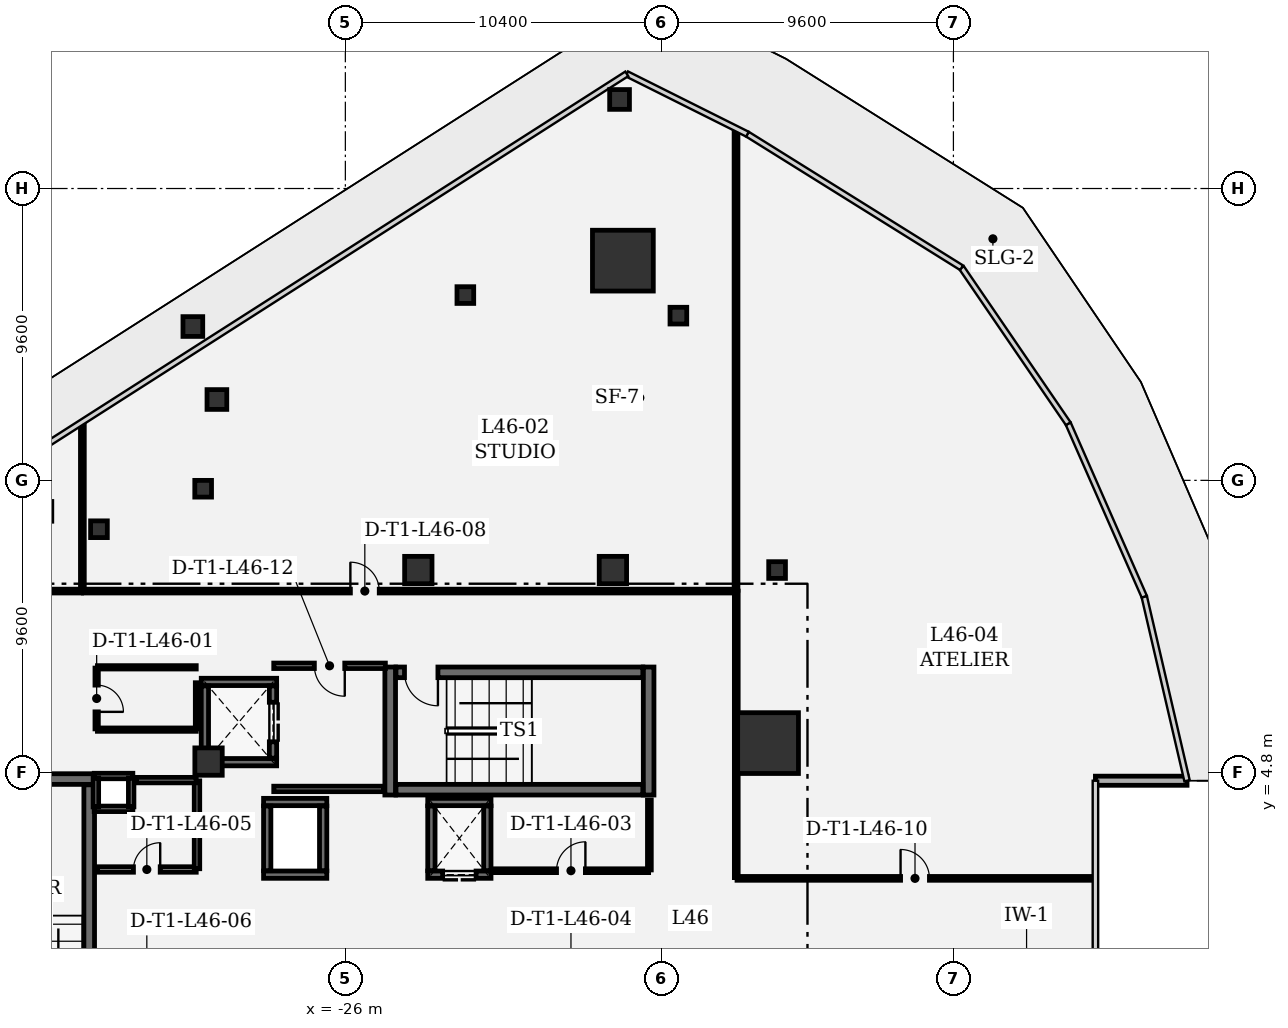
"""IFC4 building model, lengths in metres.
Left out: names, types, materials, properties, quantities, classifications, styles, units other than length and angle.
Written with IfcOpenShell. Run it as: python <this file> out.ifc"""

import sys

from ifc_helpers import new_model, si_unit, direction, frame, frame_2d, origin, origin_2d, place, context, subcontext, project, spatial, rectangle, extrude, element, fill, save


model = new_model("IFC4")
c1 = context("Model", 3, precision=1e-05, world=origin(), true_north=direction((0.0, 1.0)))
c2 = subcontext(c1, "Body", "Model", "MODEL_VIEW")
j1 = project(units=[si_unit("LENGTHUNIT", "METRE"), si_unit("PLANEANGLEUNIT", "RADIAN")], contexts=[c1])
p1 = place(None, origin())
s1 = spatial("IfcSite", under=j1, at=p1, CompositionType="ELEMENT")
p2 = place(p1, origin())
s2 = spatial("IfcBuilding", under=s1, at=p2, CompositionType="ELEMENT")
p3 = place(p2, frame((0.0, 0.0, 201.0)))
s3 = spatial("IfcBuildingStorey", under=s2, at=p3, CompositionType="ELEMENT", Elevation=201.0)
for number, where, z_axis, x_axis in (
    (1, (-12.097, 5.758, 0.0), (0.0, 0.0, 1.0), (1.0, 0.0, 0.0)),
    (2, (-16.872, 21.627, 0.0), (0.0, 0.0, 1.0), (1.0, 0.0, 0.0)),
):
    element("IfcColumn", number, at=place(p3, frame(where, z_axis=z_axis, x_axis=x_axis)), inside=s3, PredefinedType="COLUMN", context=c2, shape_type="SweptSolid", body=[
        extrude(rectangle(XDim=2.0, YDim=2.0, at=origin_2d()), origin(), (0.0, 0.0, 1.0), 4.05),
    ])
for number, where, z_axis, x_axis in (
    (3, (-23.6, 11.45, 0.0), (0.0, 0.0, 1.0), (1.0, 0.0, 0.0)),
    (4, (-17.2, 11.45, 0.0), (0.0, 0.0, 1.0), (1.0, 0.0, 0.0)),
    (5, (-30.5, 5.15, 0.0), (0.0, 0.0, 1.0), (1.0, 0.0, 0.0)),
):
    element("IfcColumn", number, at=place(p3, frame(where, z_axis=z_axis, x_axis=x_axis)), inside=s3, PredefinedType="COLUMN", context=c2, shape_type="SweptSolid", body=[
        extrude(rectangle(XDim=0.9, YDim=0.9, at=origin_2d()), origin(), (0.0, 0.0, 1.0), 4.05),
    ])
for number, where, z_axis, x_axis in (
    (6, (-31.016, 19.46, 0.0), (0.0, 0.0, 1.0), (1.0, 0.0, 0.0)),
    (7, (-16.981, 26.929, 0.0), (0.0, 0.0, 1.0), (1.0, 0.0, 0.0)),
    (8, (-30.225, 17.06, 0.0), (0.0, 0.0, 1.0), (1.0, 0.0, 0.0)),
):
    element("IfcColumn", number, at=place(p3, frame(where, z_axis=z_axis, x_axis=x_axis)), inside=s3, PredefinedType="COLUMN", context=c2, shape_type="SweptSolid", body=[
        extrude(rectangle(XDim=0.65, YDim=0.65, at=origin_2d()), origin(), (0.0, 0.0, 1.0), 4.05),
    ])
for number, where, z_axis, x_axis in (
    (9, (-34.104, 12.792, 0.0), (0.0, 0.0, 1.0), (1.0, 0.0, 0.0)),
    (10, (-22.053, 20.495, 0.0), (0.0, 0.0, 1.0), (1.0, 0.0, 0.0)),
    (11, (-30.677, 14.124, 0.0), (0.0, 0.0, 1.0), (1.0, 0.0, 0.0)),
    (12, (-15.046, 19.818, 0.0), (0.0, 0.0, 1.0), (1.0, 0.0, 0.0)),
    (13, (-11.8, 11.45, 0.0), (0.0, 0.0, 1.0), (1.0, 0.0, 0.0)),
):
    element("IfcColumn", number, at=place(p3, frame(where, z_axis=z_axis, x_axis=x_axis)), inside=s3, PredefinedType="COLUMN", context=c2, shape_type="SweptSolid", body=[
        extrude(rectangle(XDim=0.55, YDim=0.55, at=origin_2d()), origin(), (0.0, 0.0, 1.0), 4.05),
    ])
p4 = place(p3, frame((-1.329, 4.52, 0.0), z_axis=(0.0, 0.0, 1.0), x_axis=(1.0, 0.0, 0.0)))
e14 = element("IfcWall", 14, at=p4, inside=s3, PredefinedType="SOLIDWALL", context=c2, shape_type="SweptSolid", body=[
    extrude(rectangle(XDim=3.013, YDim=0.3, at=frame_2d((1.507, 0.0))), origin(), (0.0, 0.0, 1.0), 3.78),
])
for number, where, z_axis, x_axis in (
    (15, (-24.525, 8.26, 0.0), (0.0, 0.0, 1.0), (0.0, -1.0, 0.0)),
    (16, (-16.025, 4.05, 0.0), (0.0, 0.0, 1.0), (0.0, 1.0, 0.0)),
):
    element("IfcWall", number, at=place(p3, frame(where, z_axis=z_axis, x_axis=x_axis)), inside=s3, PredefinedType="SHEAR", context=c2, shape_type="SweptSolid", body=[
        extrude(rectangle(XDim=4.21, YDim=0.35, at=frame_2d((2.105, 0.0))), origin(), (0.0, 0.0, 1.0), 3.78),
    ])
p5 = place(p3, frame((-24.335, 4.225, 0.0), z_axis=(0.0, 0.0, 1.0), x_axis=(1.0, 0.0, 0.0)))
e17 = element("IfcWall", 17, at=p5, inside=s3, PredefinedType="SHEAR", context=c2, shape_type="SweptSolid", body=[
    extrude(rectangle(XDim=8.12, YDim=0.35, at=frame_2d((4.06, 0.0))), origin(), (0.0, 0.0, 1.0), 3.78),
])
p6 = place(p3, frame((-16.215, 8.085, 0.0), z_axis=(0.0, 0.0, 1.0), x_axis=(-1.0, 0.0, 0.0)))
e18 = element("IfcWall", 18, at=p6, inside=s3, PredefinedType="SHEAR", context=c2, shape_type="SweptSolid", body=[
    extrude(rectangle(XDim=8.12, YDim=0.35, at=frame_2d((4.06, 0.0))), origin(), (0.0, 0.0, 1.0), 3.78),
])
p7 = place(p6, frame((6.74, 0.0, 0.0)))
e19 = element("IfcOpeningElement", 19, at=p7, cuts=e18, PredefinedType="OPENING", context=c2, shape_type="SweptSolid", body=[
    extrude(rectangle(XDim=1.1, YDim=2.2, at=frame_2d((0.55, 1.1))), frame((0.0, 0.185, 0.0), z_axis=(0.0, -1.0, 0.0), x_axis=(1.0, 0.0, 0.0)), (0.0, 0.0, 1.0), 0.37),
])
p8 = place(p3, frame((-34.25, 4.575, 0.0), z_axis=(0.0, 0.0, 1.0), x_axis=(-1.0, 0.0, 0.0)))
e20 = element("IfcWall", 20, at=p8, inside=s3, PredefinedType="SHEAR", context=c2, shape_type="SweptSolid", body=[
    extrude(rectangle(XDim=4.21, YDim=0.35, at=frame_2d((2.105, 0.0))), origin(), (0.0, 0.0, 1.0), 3.78),
])
p9 = place(p3, frame((-34.425, -4.385, 0.0), z_axis=(0.0, 0.0, 1.0), x_axis=(0.0, 1.0, 0.0)))
e21 = element("IfcWall", 21, at=p9, inside=s3, PredefinedType="SHEAR", context=c2, shape_type="SweptSolid", body=[
    extrude(rectangle(XDim=8.77, YDim=0.35, at=frame_2d((4.385, 0.0))), origin(), (0.0, 0.0, 1.0), 3.78),
])
for number, where, z_axis, x_axis in (
    (22, (-28.26, 5.13, 0.0), (0.0, 0.0, 1.0), (-1.0, 0.0, 0.0)),
    (23, (-30.74, 7.77, 0.0), (0.0, 0.0, 1.0), (1.0, 0.0, 0.0)),
):
    element("IfcWall", number, at=place(p3, frame(where, z_axis=z_axis, x_axis=x_axis)), inside=s3, PredefinedType="SHEAR", context=c2, shape_type="SweptSolid", body=[
        extrude(rectangle(XDim=2.48, YDim=0.24, at=frame_2d((1.24, 0.0))), origin(), (0.0, 0.0, 1.0), 3.78),
    ])
p10 = place(p3, frame((-30.62, 5.262, 0.0), z_axis=(0.0, 0.0, 1.0), x_axis=(0.0, 1.0, 0.0)))
e24 = element("IfcWall", 24, at=p10, inside=s3, PredefinedType="SHEAR", context=c2, shape_type="SweptSolid", body=[
    extrude(rectangle(XDim=2.376, YDim=0.24, at=frame_2d((1.188, 0.0))), origin(), (0.0, 0.0, 1.0), 3.78),
])
p11 = place(p3, frame((-28.38, 7.638, 0.0), z_axis=(0.0, 0.0, 1.0), x_axis=(0.0, -1.0, 0.0)))
e25 = element("IfcWall", 25, at=p11, inside=s3, PredefinedType="SHEAR", context=c2, shape_type="SweptSolid", body=[
    extrude(rectangle(XDim=2.376, YDim=0.24, at=frame_2d((1.188, 0.0))), origin(), (0.0, 0.0, 1.0), 3.78),
])
p12 = place(p11, frame((0.538, 0.0, 0.0)))
e26 = element("IfcOpeningElement", 26, at=p12, cuts=e25, PredefinedType="OPENING", context=c2, shape_type="SweptSolid", body=[
    extrude(rectangle(XDim=1.3, YDim=2.3, at=frame_2d((0.65, 1.15))), frame((0.0, 0.13, 0.0), z_axis=(0.0, -1.0, 0.0), x_axis=(1.0, 0.0, 0.0)), (0.0, 0.0, 1.0), 0.26),
])
for number, where, z_axis, x_axis in (
    (27, (-26.61, 1.43, 0.0), (0.0, 0.0, 1.0), (-1.0, 0.0, 0.0)),
    (28, (-28.69, 3.82, 0.0), (0.0, 0.0, 1.0), (1.0, 0.0, 0.0)),
):
    element("IfcWall", number, at=place(p3, frame(where, z_axis=z_axis, x_axis=x_axis)), inside=s3, PredefinedType="SHEAR", context=c2, shape_type="SweptSolid", body=[
        extrude(rectangle(XDim=2.08, YDim=0.24, at=frame_2d((1.04, 0.0))), origin(), (0.0, 0.0, 1.0), 3.78),
    ])
for number, where, z_axis, x_axis in (
    (29, (-28.57, 1.562, 0.0), (0.0, 0.0, 1.0), (0.0, 1.0, 0.0)),
    (30, (-26.73, 3.688, 0.0), (0.0, 0.0, 1.0), (0.0, -1.0, 0.0)),
):
    element("IfcWall", number, at=place(p3, frame(where, z_axis=z_axis, x_axis=x_axis)), inside=s3, PredefinedType="SHEAR", context=c2, shape_type="SweptSolid", body=[
        extrude(rectangle(XDim=2.126, YDim=0.24, at=frame_2d((1.063, 0.0))), origin(), (0.0, 0.0, 1.0), 3.78),
    ])
p13 = place(p3, frame((-21.21, 1.43, 0.0), z_axis=(0.0, 0.0, 1.0), x_axis=(-1.0, 0.0, 0.0)))
e31 = element("IfcWall", 31, at=p13, inside=s3, PredefinedType="SHEAR", context=c2, shape_type="SweptSolid", body=[
    extrude(rectangle(XDim=2.08, YDim=0.24, at=frame_2d((1.04, 0.0))), origin(), (0.0, 0.0, 1.0), 3.78),
])
p14 = place(p13, frame((0.49, 0.0, 0.0)))
e32 = element("IfcOpeningElement", 32, at=p14, cuts=e31, PredefinedType="OPENING", context=c2, shape_type="SweptSolid", body=[
    extrude(rectangle(XDim=1.1, YDim=2.2, at=frame_2d((0.55, 1.1))), frame((0.0, 0.13, 0.0), z_axis=(0.0, -1.0, 0.0), x_axis=(1.0, 0.0, 0.0)), (0.0, 0.0, 1.0), 0.26),
])
p15 = place(p3, frame((-23.29, 3.82, 0.0), z_axis=(0.0, 0.0, 1.0), x_axis=(1.0, 0.0, 0.0)))
e33 = element("IfcWall", 33, at=p15, inside=s3, PredefinedType="SHEAR", context=c2, shape_type="SweptSolid", body=[
    extrude(rectangle(XDim=2.08, YDim=0.24, at=frame_2d((1.04, 0.0))), origin(), (0.0, 0.0, 1.0), 3.78),
])
for number, where, z_axis, x_axis in (
    (34, (-23.17, 1.562, 0.0), (0.0, 0.0, 1.0), (0.0, 1.0, 0.0)),
    (35, (-21.33, 3.688, 0.0), (0.0, 0.0, 1.0), (0.0, -1.0, 0.0)),
):
    element("IfcWall", number, at=place(p3, frame(where, z_axis=z_axis, x_axis=x_axis)), inside=s3, PredefinedType="SHEAR", context=c2, shape_type="SweptSolid", body=[
        extrude(rectangle(XDim=2.126, YDim=0.24, at=frame_2d((1.063, 0.0))), origin(), (0.0, 0.0, 1.0), 3.78),
    ])
for number, where, z_axis, x_axis in (
    (36, (-32.99, 3.595, 0.0), (0.0, 0.0, 1.0), (-1.0, 0.0, 0.0)),
    (37, (-34.26, 4.675, 0.0), (0.0, 0.0, 1.0), (1.0, 0.0, 0.0)),
):
    element("IfcWall", number, at=place(p3, frame(where, z_axis=z_axis, x_axis=x_axis)), inside=s3, PredefinedType="PARTITIONING", context=c2, shape_type="SweptSolid", body=[
        extrude(rectangle(XDim=1.27, YDim=0.18, at=frame_2d((0.635, 0.0))), origin(), (0.0, 0.0, 1.0), 3.78),
    ])
for number, where, z_axis, x_axis in (
    (38, (-34.205, 3.66, 0.0), (0.0, 0.0, 1.0), (0.0, 1.0, 0.0)),
    (39, (-33.045, 4.61, 0.0), (0.0, 0.0, 1.0), (0.0, -1.0, 0.0)),
):
    element("IfcWall", number, at=place(p3, frame(where, z_axis=z_axis, x_axis=x_axis)), inside=s3, PredefinedType="PARTITIONING", context=c2, shape_type="SweptSolid", body=[
        extrude(rectangle(XDim=0.95, YDim=0.18, at=frame_2d((0.475, 0.0))), origin(), (0.0, 0.0, 1.0), 3.78),
    ])
p16 = place(p3, frame((-28.355, 4.25, 0.0), z_axis=(0.0, 0.0, 1.0), x_axis=(1.0, 0.0, 0.0)))
e40 = element("IfcWall", 40, at=p16, inside=s3, PredefinedType="PARTITIONING", context=c2, shape_type="SweptSolid", body=[
    extrude(rectangle(XDim=3.622, YDim=0.18, at=frame_2d((1.811, 0.0))), origin(), (0.0, 0.0, 1.0), 3.78),
])
p17 = place(p3, frame((-24.684, 8.3, 0.0), z_axis=(0.0, 0.0, 1.0), x_axis=(-1.0, 0.0, 0.0)))
e41 = element("IfcWall", 41, at=p17, inside=s3, PredefinedType="PARTITIONING", context=c2, shape_type="SweptSolid", body=[
    extrude(rectangle(XDim=3.671, YDim=0.18, at=frame_2d((1.835, 0.0))), origin(), (0.0, 0.0, 1.0), 3.78),
])
p18 = place(p17, frame((1.335, 0.0, 0.0)))
e42 = element("IfcOpeningElement", 42, at=p18, cuts=e41, PredefinedType="OPENING", context=c2, shape_type="SweptSolid", body=[
    extrude(rectangle(XDim=1.0, YDim=2.15, at=frame_2d((0.5, 1.075))), frame((0.0, 0.1, 0.0), z_axis=(0.0, -1.0, 0.0), x_axis=(1.0, 0.0, 0.0)), (0.0, 0.0, 1.0), 0.2),
])
p19 = place(p3, frame((-34.18, 8.225, 0.0), z_axis=(0.0, 0.0, 1.0), x_axis=(0.0, -1.0, 0.0)))
e43 = element("IfcWall", 43, at=p19, inside=s3, PredefinedType="PARTITIONING", context=c2, shape_type="SweptSolid", body=[
    extrude(rectangle(XDim=2.0, YDim=0.11, at=frame_2d((1.0, 0.0))), origin(), (0.0, 0.0, 1.0), 3.78),
])
p20 = place(p19, frame((0.56, 0.0, 0.0)))
e44 = element("IfcOpeningElement", 44, at=p20, cuts=e43, PredefinedType="OPENING", context=c2, shape_type="SweptSolid", body=[
    extrude(rectangle(XDim=0.88, YDim=2.1, at=frame_2d((0.44, 1.05))), frame((0.0, 0.065, 0.0), z_axis=(0.0, -1.0, 0.0), x_axis=(1.0, 0.0, 0.0)), (0.0, 0.0, 1.0), 0.13),
])
p21 = place(p3, frame((-34.155, 6.2, 0.0), z_axis=(0.0, 0.0, 1.0), x_axis=(1.0, 0.0, 0.0)))
e45 = element("IfcWall", 45, at=p21, inside=s3, PredefinedType="PARTITIONING", context=c2, shape_type="SweptSolid", body=[
    extrude(rectangle(XDim=3.25, YDim=0.11, at=frame_2d((1.625, 0.0))), origin(), (0.0, 0.0, 1.0), 3.344),
])
p22 = place(p3, frame((-30.88, 6.225, 0.0), z_axis=(0.0, 0.0, 1.0), x_axis=(0.0, 1.0, 0.0)))
e46 = element("IfcWall", 46, at=p22, inside=s3, PredefinedType="PARTITIONING", context=c2, shape_type="SweptSolid", body=[
    extrude(rectangle(XDim=1.518, YDim=0.11, at=frame_2d((0.759, 0.0))), origin(), (0.0, 0.0, 1.0), 3.78),
])
p23 = place(p3, frame((-30.905, 8.25, 0.0), z_axis=(0.0, 0.0, 1.0), x_axis=(-1.0, 0.0, 0.0)))
e47 = element("IfcWall", 47, at=p23, inside=s3, PredefinedType="PARTITIONING", context=c2, shape_type="SweptSolid", body=[
    extrude(rectangle(XDim=3.25, YDim=0.11, at=frame_2d((1.625, 0.0))), origin(), (0.0, 0.0, 1.0), 3.78),
])
p24 = place(p3, frame((-21.134, 1.56, 0.0), z_axis=(0.0, 0.0, 1.0), x_axis=(1.0, 0.0, 0.0)))
e48 = element("IfcWall", 48, at=p24, inside=s3, PredefinedType="PARTITIONING", context=c2, shape_type="SweptSolid", body=[
    extrude(rectangle(XDim=5.109, YDim=0.125, at=frame_2d((2.554, 0.0))), origin(), (0.0, 0.0, 1.0), 3.78),
])
p25 = place(p24, frame((2.079, 0.0, 0.0)))
e49 = element("IfcOpeningElement", 49, at=p25, cuts=e48, PredefinedType="OPENING", context=c2, shape_type="SweptSolid", body=[
    extrude(rectangle(XDim=0.95, YDim=2.15, at=frame_2d((0.475, 1.075))), frame((0.0, 0.073, 0.0), z_axis=(0.0, -1.0, 0.0), x_axis=(1.0, 0.0, 0.0)), (0.0, 0.0, 1.0), 0.145),
])
p26 = place(p3, frame((-16.0, 1.585, 0.0), z_axis=(0.0, 0.0, 1.0), x_axis=(0.0, 1.0, 0.0)))
e50 = element("IfcWall", 50, at=p26, inside=s3, PredefinedType="PARTITIONING", context=c2, shape_type="SweptSolid", body=[
    extrude(rectangle(XDim=2.302, YDim=0.125, at=frame_2d((1.151, 0.0))), origin(), (0.0, 0.0, 1.0), 3.78),
])
p27 = place(p3, frame((-34.155, 1.6, 0.0), z_axis=(0.0, 0.0, 1.0), x_axis=(1.0, 0.0, 0.0)))
e51 = element("IfcWall", 51, at=p27, inside=s3, PredefinedType="PARTITIONING", context=c2, shape_type="SweptSolid", body=[
    extrude(rectangle(XDim=3.25, YDim=0.18, at=frame_2d((1.625, 0.0))), origin(), (0.0, 0.0, 1.0), 3.78),
])
p28 = place(p27, frame((1.185, 0.0, 0.0)))
e52 = element("IfcOpeningElement", 52, at=p28, cuts=e51, PredefinedType="OPENING", context=c2, shape_type="SweptSolid", body=[
    extrude(rectangle(XDim=0.88, YDim=2.1, at=frame_2d((0.44, 1.05))), frame((0.0, 0.1, 0.0), z_axis=(0.0, -1.0, 0.0), x_axis=(1.0, 0.0, 0.0)), (0.0, 0.0, 1.0), 0.2),
])
p29 = place(p3, frame((-30.88, 1.625, 0.0), z_axis=(0.0, 0.0, 1.0), x_axis=(0.0, 1.0, 0.0)))
e53 = element("IfcWall", 53, at=p29, inside=s3, PredefinedType="PARTITIONING", context=c2, shape_type="SweptSolid", body=[
    extrude(rectangle(XDim=2.89, YDim=0.18, at=frame_2d((1.445, 0.0))), origin(), (0.0, 0.0, 1.0), 3.78),
])
p30 = place(p3, frame((-30.905, 4.54, 0.0), z_axis=(0.0, 0.0, 1.0), x_axis=(-1.0, 0.0, 0.0)))
e54 = element("IfcWall", 54, at=p30, inside=s3, PredefinedType="PARTITIONING", context=c2, shape_type="SweptSolid", body=[
    extrude(rectangle(XDim=1.975, YDim=0.18, at=frame_2d((0.988, 0.0))), origin(), (0.0, 0.0, 1.0), 3.78),
])
p31 = place(p3, frame((-34.675, 10.758, 0.0), z_axis=(0.0, 0.0, 1.0), x_axis=(-1.0, 0.0, 0.0)))
e55 = element("IfcWall", 55, at=p31, inside=s3, PredefinedType="PARTITIONING", context=c2, shape_type="SweptSolid", body=[
    extrude(rectangle(XDim=3.158, YDim=0.125, at=frame_2d((1.579, 0.0))), origin(), (0.0, 0.0, 1.0), 2.9),
])
p32 = place(p3, frame((-34.65, 10.783, 0.0), z_axis=(0.0, 0.0, 1.0), x_axis=(0.0, 1.0, 0.0)))
e56 = element("IfcWall", 56, at=p32, inside=s3, PredefinedType="PARTITIONING", context=c2, shape_type="SweptSolid", body=[
    extrude(rectangle(XDim=5.463, YDim=0.125, at=frame_2d((2.731, 0.0))), origin(), (0.0, 0.0, 1.0), 3.78),
])
p33 = place(p3, frame((-34.617, 10.758, 0.0), z_axis=(0.0, 0.0, 1.0), x_axis=(1.0, 0.0, 0.0)))
e57 = element("IfcWall", 57, at=p33, inside=s3, PredefinedType="PARTITIONING", context=c2, shape_type="SweptSolid", body=[
    extrude(rectangle(XDim=21.442, YDim=0.125, at=frame_2d((10.721, 0.0))), origin(), (0.0, 0.0, 1.0), 2.9),
])
p34 = place(p33, frame((8.782, 0.0, 0.0)))
e58 = element("IfcOpeningElement", 58, at=p34, cuts=e57, PredefinedType="OPENING", context=c2, shape_type="SweptSolid", body=[
    extrude(rectangle(XDim=0.95, YDim=2.15, at=frame_2d((0.475, 1.075))), frame((0.0, 0.073, 0.0), z_axis=(0.0, -1.0, 0.0), x_axis=(1.0, 0.0, 0.0)), (0.0, 0.0, 1.0), 0.145),
])
p35 = place(p3, frame((-13.15, 10.783, 0.0), z_axis=(0.0, 0.0, 1.0), x_axis=(0.0, 1.0, 0.0)))
e59 = element("IfcWall", 59, at=p35, inside=s3, PredefinedType="PARTITIONING", context=c2, shape_type="SweptSolid", body=[
    extrude(rectangle(XDim=15.111, YDim=0.125, at=frame_2d((7.556, 0.0))), origin(), (0.0, 0.0, 1.0), 2.9),
])
p36 = place(p3, frame((-13.142, 10.758, 0.0), z_axis=(0.0, 0.0, 1.0), x_axis=(0.0, -1.0, 0.0)))
e60 = element("IfcWall", 60, at=p36, inside=s3, PredefinedType="PARTITIONING", context=c2, shape_type="SweptSolid", body=[
    extrude(rectangle(XDim=9.425, YDim=0.125, at=frame_2d((4.713, 0.0))), origin(), (0.0, 0.0, 1.0), 2.9),
])
p37 = place(p3, frame((-13.117, 1.308, 0.0), z_axis=(0.0, 0.0, 1.0), x_axis=(1.0, 0.0, 0.0)))
e61 = element("IfcWall", 61, at=p37, inside=s3, PredefinedType="PARTITIONING", context=c2, shape_type="SweptSolid", body=[
    extrude(rectangle(XDim=11.708, YDim=0.125, at=frame_2d((5.854, 0.0))), origin(), (0.0, 0.0, 1.0), 3.78),
])
p38 = place(p37, frame((5.379, 0.0, 0.0)))
e62 = element("IfcOpeningElement", 62, at=p38, cuts=e61, PredefinedType="OPENING", context=c2, shape_type="SweptSolid", body=[
    extrude(rectangle(XDim=0.95, YDim=2.15, at=frame_2d((0.475, 1.075))), frame((0.0, 0.073, 0.0), z_axis=(0.0, -1.0, 0.0), x_axis=(1.0, 0.0, 0.0)), (0.0, 0.0, 1.0), 0.145),
])
p39 = place(p7, origin())
e63 = element("IfcDoor", 63, at=p39, inside=s3, OperationType="SINGLE_SWING_LEFT", PredefinedType="DOOR", context=c2, shape_type="SweptSolid", body=[
    extrude(rectangle(XDim=1.1, YDim=2.2, at=frame_2d((0.55, 1.1))), frame((0.0, 0.025, 0.0), z_axis=(0.0, -1.0, 0.0), x_axis=(1.0, 0.0, 0.0)), (0.0, 0.0, 1.0), 0.05),
])
fill(e19, e63)
p40 = place(p12, origin())
e64 = element("IfcDoor", 64, at=p40, inside=s3, OperationType="DOUBLE_DOOR_SLIDING", PredefinedType="DOOR", context=c2, shape_type="SweptSolid", body=[
    extrude(rectangle(XDim=1.3, YDim=2.3, at=frame_2d((0.65, 1.15))), frame((0.0, 0.025, 0.0), z_axis=(0.0, -1.0, 0.0), x_axis=(1.0, 0.0, 0.0)), (0.0, 0.0, 1.0), 0.05),
])
fill(e26, e64)
p41 = place(p14, origin())
e65 = element("IfcDoor", 65, at=p41, inside=s3, OperationType="DOUBLE_DOOR_SLIDING", PredefinedType="DOOR", context=c2, shape_type="SweptSolid", body=[
    extrude(rectangle(XDim=1.1, YDim=2.2, at=frame_2d((0.55, 1.1))), frame((0.0, 0.025, 0.0), z_axis=(0.0, -1.0, 0.0), x_axis=(1.0, 0.0, 0.0)), (0.0, 0.0, 1.0), 0.05),
])
fill(e32, e65)
p42 = place(p20, origin())
e66 = element("IfcDoor", 66, at=p42, inside=s3, OperationType="SINGLE_SWING_RIGHT", PredefinedType="DOOR", context=c2, shape_type="SweptSolid", body=[
    extrude(rectangle(XDim=0.88, YDim=2.1, at=frame_2d((0.44, 1.05))), frame((0.0, 0.025, 0.0), z_axis=(0.0, -1.0, 0.0), x_axis=(1.0, 0.0, 0.0)), (0.0, 0.0, 1.0), 0.05),
])
fill(e44, e66)
p43 = place(p25, origin())
e67 = element("IfcDoor", 67, at=p43, inside=s3, OperationType="SINGLE_SWING_RIGHT", PredefinedType="DOOR", context=c2, shape_type="SweptSolid", body=[
    extrude(rectangle(XDim=0.95, YDim=2.15, at=frame_2d((0.475, 1.075))), frame((0.0, 0.025, 0.0), z_axis=(0.0, -1.0, 0.0), x_axis=(1.0, 0.0, 0.0)), (0.0, 0.0, 1.0), 0.05),
])
fill(e49, e67)
p44 = place(p28, origin())
e68 = element("IfcDoor", 68, at=p44, inside=s3, OperationType="SINGLE_SWING_RIGHT", PredefinedType="DOOR", context=c2, shape_type="SweptSolid", body=[
    extrude(rectangle(XDim=0.88, YDim=2.1, at=frame_2d((0.44, 1.05))), frame((0.0, 0.025, 0.0), z_axis=(0.0, -1.0, 0.0), x_axis=(1.0, 0.0, 0.0)), (0.0, 0.0, 1.0), 0.05),
])
fill(e52, e68)
p45 = place(p34, origin())
e69 = element("IfcDoor", 69, at=p45, inside=s3, OperationType="SINGLE_SWING_LEFT", PredefinedType="DOOR", context=c2, shape_type="SweptSolid", body=[
    extrude(rectangle(XDim=0.95, YDim=2.15, at=frame_2d((0.475, 1.075))), frame((0.0, 0.025, 0.0), z_axis=(0.0, -1.0, 0.0), x_axis=(1.0, 0.0, 0.0)), (0.0, 0.0, 1.0), 0.05),
])
fill(e58, e69)
p46 = place(p38, origin())
e70 = element("IfcDoor", 70, at=p46, inside=s3, OperationType="SINGLE_SWING_LEFT", PredefinedType="DOOR", context=c2, shape_type="SweptSolid", body=[
    extrude(rectangle(XDim=0.95, YDim=2.15, at=frame_2d((0.475, 1.075))), frame((0.0, 0.025, 0.0), z_axis=(0.0, -1.0, 0.0), x_axis=(1.0, 0.0, 0.0)), (0.0, 0.0, 1.0), 0.05),
])
fill(e62, e70)
p47 = place(p18, origin())
e71 = element("IfcDoor", 71, at=p47, inside=s3, OperationType="SINGLE_SWING_LEFT", PredefinedType="DOOR", context=c2, shape_type="SweptSolid", body=[
    extrude(rectangle(XDim=1.0, YDim=2.15, at=frame_2d((0.5, 1.075))), frame((0.0, 0.025, 0.0), z_axis=(0.0, -1.0, 0.0), x_axis=(1.0, 0.0, 0.0)), (0.0, 0.0, 1.0), 0.05),
])
fill(e42, e71)
save(model, sys.argv[1])
